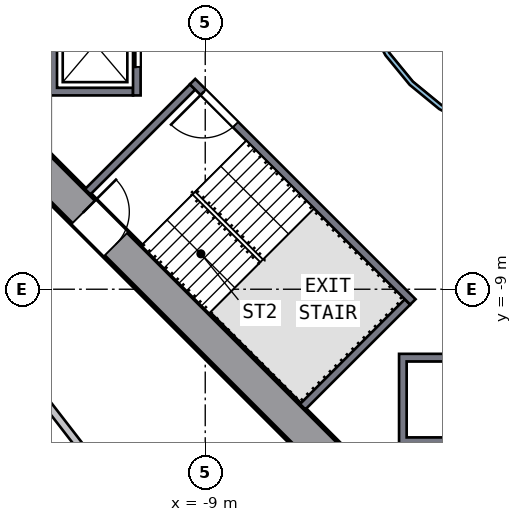
"""IFC4 building model, lengths in metres.
Left out: names, types, materials, properties, quantities, classifications, styles, units other than length and angle.
Written with IfcOpenShell. Run it as: python <this file> out.ifc"""

import sys

from ifc_helpers import new_model, si_unit, direction, frame, frame_2d, origin, place, context, subcontext, project, spatial, polyline, rectangle, outline, extrude, element, fill, save


model = new_model("IFC4")
c1 = context("Model", 3, precision=1e-05, world=origin(), true_north=direction((0.0, 1.0)))
c2 = subcontext(c1, "Body", "Model", "MODEL_VIEW")
j1 = project(units=[si_unit("LENGTHUNIT", "METRE"), si_unit("PLANEANGLEUNIT", "RADIAN")], contexts=[c1])
p1 = place(None, origin())
s1 = spatial("IfcSite", under=j1, at=p1, CompositionType="ELEMENT")
p2 = place(p1, origin())
s2 = spatial("IfcBuilding", under=s1, at=p2, CompositionType="ELEMENT")
p3 = place(p2, frame((0.0, 0.0, 64.5)))
s3 = spatial("IfcBuildingStorey", under=s2, at=p3, CompositionType="ELEMENT", Elevation=64.5)
p4 = place(p3, frame((-13.682, -5.481, 0.0), z_axis=(0.0, 0.0, 1.0), x_axis=(0.707106781, -0.707106781, 0.0)))
e1 = element("IfcWall", 1, at=p4, inside=s3, PredefinedType="SHEAR", context=c2, shape_type="SweptSolid", body=[
    extrude(rectangle(XDim=11.598, YDim=0.9, at=frame_2d((5.799, 0.0))), origin(), (0.0, 0.0, 1.0), 3.5),
])
p5 = place(p4, frame((2.099, 0.0, 0.0)))
e2 = element("IfcOpeningElement", 2, at=p5, cuts=e1, PredefinedType="OPENING", context=c2, shape_type="SweptSolid", body=[
    extrude(rectangle(XDim=1.2, YDim=2.1, at=frame_2d((0.6, 1.05))), frame((0.0, 0.46, 0.0), z_axis=(0.0, -1.0, 0.0), x_axis=(1.0, 0.0, 0.0)), (0.0, 0.0, 1.0), 0.92),
])
p6 = place(p3, origin())
e3 = element("IfcWall", 3, at=p6, inside=s3, PredefinedType="SOLIDWALL", context=c2, shape_type="SweptSolid", body=[
    extrude(outline(polyline([(-13.1, -3.9), (-13.1, -1.2), (-10.9, -1.2), (-10.9, -1.4), (-12.9, -1.4), (-12.9, -3.7), (-10.9, -3.7), (-10.9, -3.9), (-13.1, -3.9)])), origin(), (0.0, 0.0, 1.0), 3.19),
])
p7 = place(p3, frame((-10.8, -1.2, 0.0), z_axis=(0.0, 0.0, 1.0), x_axis=(0.0, -1.0, 0.0)))
e4 = element("IfcWall", 4, at=p7, inside=s3, PredefinedType="SOLIDWALL", context=c2, shape_type="SweptSolid", body=[
    extrude(rectangle(XDim=2.7, YDim=0.2, at=frame_2d((1.35, 0.0))), origin(), (0.0, 0.0, 1.0), 3.19),
])
p8 = place(p7, frame((0.75, 0.0, 0.0)))
e5 = element("IfcOpeningElement", 5, at=p8, cuts=e4, PredefinedType="OPENING", context=c2, shape_type="SweptSolid", body=[
    extrude(rectangle(XDim=1.2, YDim=2.1, at=frame_2d((0.6, 1.05))), frame((0.0, 0.11, 0.0), z_axis=(0.0, -1.0, 0.0), x_axis=(1.0, 0.0, 0.0)), (0.0, 0.0, 1.0), 0.22),
])
p9 = place(p3, origin())
e6 = element("IfcWall", 6, at=p9, inside=s3, PredefinedType="SOLIDWALL", context=c2, shape_type="SweptSolid", body=[
    extrude(outline(polyline([(-1.2, -13.1), (-3.9, -13.1), (-3.9, -10.7), (-1.2, -10.7), (-1.2, -13.1)]), holes=[polyline([(-3.7, -10.9), (-3.7, -12.9), (-1.4, -12.9), (-1.4, -10.9), (-3.7, -10.9)])]), origin(), (0.0, 0.0, 1.0), 3.19),
])
p10 = place(p3, frame((-3.535, -9.334, 0.0), z_axis=(0.0, 0.0, 1.0), x_axis=(-0.707106781, 0.707106781, 0.0)))
e7 = element("IfcWall", 7, at=p10, inside=s3, PredefinedType="SOLIDWALL", context=c2, shape_type="SweptSolid", body=[
    extrude(rectangle(XDim=8.2, YDim=0.2, at=frame_2d((4.1, 0.0))), origin(), (0.0, 0.0, 1.0), 3.19),
])
p11 = place(p10, frame((6.6, 0.0, 0.0)))
e8 = element("IfcOpeningElement", 8, at=p11, cuts=e7, PredefinedType="OPENING", context=c2, shape_type="SweptSolid", body=[
    extrude(rectangle(XDim=1.2, YDim=2.1, at=frame_2d((0.6, 1.05))), frame((0.0, 0.11, 0.0), z_axis=(0.0, -1.0, 0.0), x_axis=(1.0, 0.0, 0.0)), (0.0, 0.0, 1.0), 0.22),
])
for number, where, z_axis, x_axis in (
    (9, (-9.334, -3.677, 0.0), (0.0, 0.0, 1.0), (-0.707, -0.707, 0.0)),
    (10, (-3.677, -9.334, 0.0), (0.0, 0.0, 1.0), (-0.707, -0.707, 0.0)),
):
    element("IfcWall", number, at=place(p3, frame(where, z_axis=z_axis, x_axis=x_axis)), inside=s3, PredefinedType="SOLIDWALL", context=c2, shape_type="SweptSolid", body=[
        extrude(rectangle(XDim=3.9, YDim=0.2, at=frame_2d((1.95, 0.0))), origin(), (0.0, 0.0, 1.0), 3.19),
    ])
p12 = place(p3, origin())
e11 = element("IfcWall", 11, at=p12, inside=s3, PredefinedType="SOLIDWALL", context=c2, shape_type="SweptSolid", body=[
    extrude(outline(polyline([(5.021, -0.999), (4.73, -1.959), (4.257, -2.844), (3.62, -3.62), (2.844, -4.257), (1.959, -4.73), (0.999, -5.021), (0.0, -5.12), (-0.999, -5.021), (-1.959, -4.73), (-2.844, -4.257), (-3.62, -3.62), (-4.257, -2.844), (-4.73, -1.959), (-5.021, -0.999), (-5.12, 0.0), (-5.021, 0.999), (-4.73, 1.959), (-4.257, 2.844), (-3.62, 3.62), (-2.844, 4.257), (-1.959, 4.73), (-0.999, 5.021), (0.0, 5.12), (0.999, 5.021), (1.959, 4.73), (2.844, 4.257), (3.62, 3.62), (4.257, 2.844), (4.73, 1.959), (5.021, 0.999), (5.12, 0.0), (5.021, -0.999)]), holes=[polyline([(4.904, 0.976), (4.619, 1.913), (4.157, 2.778), (3.535, 3.535), (2.778, 4.157), (1.913, 4.619), (0.976, 4.904), (0.0, 5.0), (-0.976, 4.904), (-1.913, 4.619), (-2.778, 4.157), (-3.535, 3.535), (-4.157, 2.778), (-4.619, 1.913), (-4.904, 0.976), (-5.0, 0.0), (-4.904, -0.976), (-4.619, -1.913), (-4.157, -2.778), (-3.535, -3.535), (-2.778, -4.157), (-1.913, -4.619), (-0.976, -4.904), (0.0, -5.0), (0.976, -4.904), (1.913, -4.619), (2.778, -4.157), (3.535, -3.535), (4.157, -2.778), (4.619, -1.913), (4.904, -0.976), (5.0, 0.0), (4.904, 0.976)])]), origin(), (0.0, 0.0, 1.0), 3.19),
])
p13 = place(p3, frame((-13.382, -11.725, 0.0), z_axis=(0.0, 0.0, 1.0), x_axis=(0.611222673, -0.791458682, 0.0)))
e12 = element("IfcWall", 12, at=p13, inside=s3, PredefinedType="SOLIDWALL", context=c2, shape_type="SweptSolid", body=[
    extrude(rectangle(XDim=3.4, YDim=0.2, at=frame_2d((1.7, 0.0))), origin(), (0.0, 0.0, 1.0), 3.19),
])
p14 = place(p8, origin())
e13 = element("IfcDoor", 13, at=p14, inside=s3, OperationType="DOUBLE_DOOR_SLIDING", PredefinedType="DOOR", context=c2, shape_type="SweptSolid", body=[
    extrude(rectangle(XDim=1.2, YDim=2.1, at=frame_2d((0.6, 1.05))), frame((0.0, 0.025, 0.0), z_axis=(0.0, -1.0, 0.0), x_axis=(1.0, 0.0, 0.0)), (0.0, 0.0, 1.0), 0.05),
])
fill(e5, e13)
p15 = place(p11, origin())
e14 = element("IfcDoor", 14, at=p15, inside=s3, OperationType="SINGLE_SWING_RIGHT", PredefinedType="DOOR", context=c2, shape_type="SweptSolid", body=[
    extrude(rectangle(XDim=1.2, YDim=2.1, at=frame_2d((0.6, 1.05))), frame((0.0, 0.025, 0.0), z_axis=(0.0, -1.0, 0.0), x_axis=(1.0, 0.0, 0.0)), (0.0, 0.0, 1.0), 0.05),
])
fill(e8, e14)
p16 = place(p5, origin())
e15 = element("IfcDoor", 15, at=p16, inside=s3, OperationType="SINGLE_SWING_LEFT", PredefinedType="DOOR", context=c2, shape_type="SweptSolid", body=[
    extrude(rectangle(XDim=1.2, YDim=2.1, at=frame_2d((0.6, 1.05))), frame((0.0, 0.025, 0.0), z_axis=(0.0, -1.0, 0.0), x_axis=(1.0, 0.0, 0.0)), (0.0, 0.0, 1.0), 0.05),
])
fill(e2, e15)
save(model, sys.argv[1])
